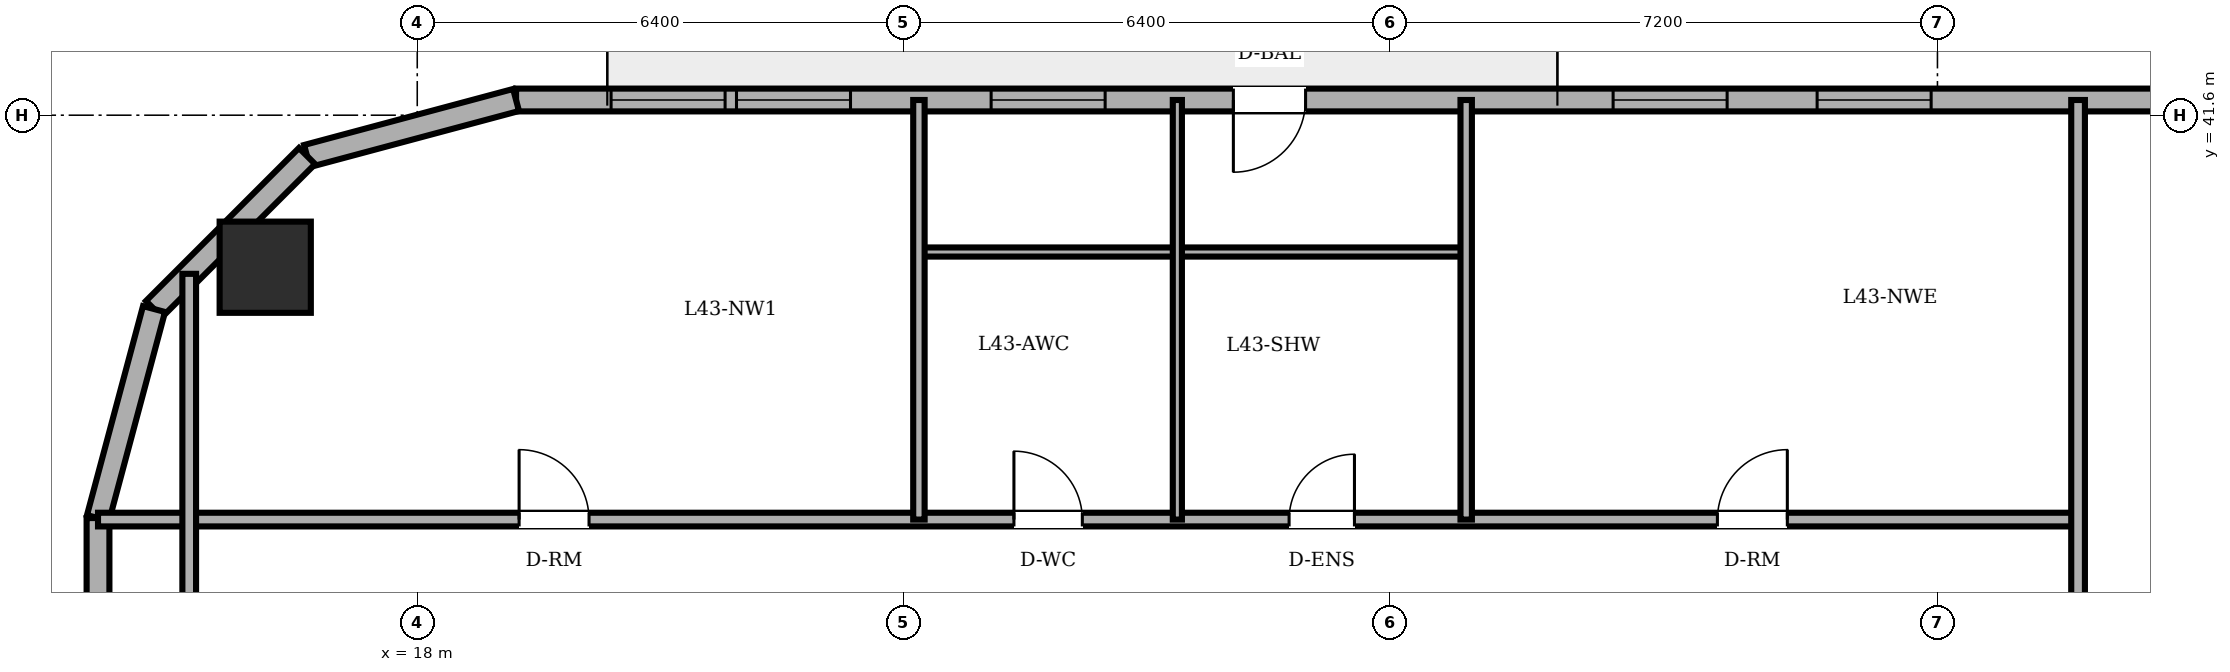
"""IFC4 building model, lengths in metres.
Left out: names, types, materials, properties, quantities, classifications, styles, units other than length and angle.
Written with IfcOpenShell. Run it as: python <this file> out.ifc"""

import sys

from ifc_helpers import new_model, si_unit, direction, frame, frame_2d, origin, origin_2d, place, context, subcontext, project, spatial, rectangle, circle, extrude, element, fill, save


model = new_model("IFC4")
c1 = context("Model", 3, precision=1e-05, world=origin(), true_north=direction((0.0, 1.0)))
c2 = subcontext(c1, "Body", "Model", "MODEL_VIEW")
j1 = project(units=[si_unit("LENGTHUNIT", "METRE"), si_unit("PLANEANGLEUNIT", "RADIAN")], contexts=[c1])
p1 = place(None, origin())
s1 = spatial("IfcSite", under=j1, at=p1, CompositionType="ELEMENT")
p2 = place(p1, origin())
s2 = spatial("IfcBuilding", under=s1, at=p2, CompositionType="ELEMENT")
p3 = place(p2, frame((0.0, 0.0, 165.4)))
s3 = spatial("IfcBuildingStorey", under=s2, at=p3, CompositionType="ELEMENT", Elevation=165.4)
p4 = place(p3, frame((16.0, 39.6, 0.0), z_axis=(0.0, 0.0, 1.0), x_axis=(1.0, 0.0, 0.0)))
e1 = element("IfcColumn", 1, at=p4, inside=s3, PredefinedType="COLUMN", context=c2, shape_type="SweptSolid", body=[
    extrude(circle(Radius=0.6, at=origin_2d()), origin(), (0.0, 0.0, 1.0), 3.6),
])
p5 = place(p3, frame((49.582, 41.8, 0.0), z_axis=(0.0, 0.0, 1.0), x_axis=(-1.0, 0.0, 0.0)))
e2 = element("IfcWall", 2, at=p5, inside=s3, PredefinedType="SOLIDWALL", context=c2, shape_type="SweptSolid", body=[
    extrude(rectangle(XDim=30.282, YDim=0.3, at=frame_2d((15.141, 0.0))), origin(), (0.0, 0.0, 1.0), 3.4),
])
p6 = place(p5, frame((19.895, 0.0, 0.0)))
e3 = element("IfcOpeningElement", 3, at=p6, cuts=e2, PredefinedType="OPENING", context=c2, shape_type="SweptSolid", body=[
    extrude(rectangle(XDim=0.95, YDim=2.2, at=frame_2d((0.475, 1.1))), frame((0.0, 0.16, 0.0), z_axis=(0.0, -1.0, 0.0), x_axis=(1.0, 0.0, 0.0)), (0.0, 0.0, 1.0), 0.32),
])
p7 = place(p5, frame((2.727, 0.0, 0.85)))
e4 = element("IfcOpeningElement", 4, at=p7, cuts=e2, PredefinedType="OPENING", context=c2, shape_type="SweptSolid", body=[
    extrude(rectangle(XDim=1.5, YDim=1.55, at=frame_2d((0.75, 0.775))), frame((0.0, 0.16, 0.0), z_axis=(0.0, -1.0, 0.0), x_axis=(1.0, 0.0, 0.0)), (0.0, 0.0, 1.0), 0.32),
])
p8 = place(p5, frame((5.855, 0.0, 0.85)))
e5 = element("IfcOpeningElement", 5, at=p8, cuts=e2, PredefinedType="OPENING", context=c2, shape_type="SweptSolid", body=[
    extrude(rectangle(XDim=1.5, YDim=1.55, at=frame_2d((0.75, 0.775))), frame((0.0, 0.16, 0.0), z_axis=(0.0, -1.0, 0.0), x_axis=(1.0, 0.0, 0.0)), (0.0, 0.0, 1.0), 0.32),
])
p9 = place(p5, frame((11.665, 0.0, 0.85)))
e6 = element("IfcOpeningElement", 6, at=p9, cuts=e2, PredefinedType="OPENING", context=c2, shape_type="SweptSolid", body=[
    extrude(rectangle(XDim=1.5, YDim=1.55, at=frame_2d((0.75, 0.775))), frame((0.0, 0.16, 0.0), z_axis=(0.0, -1.0, 0.0), x_axis=(1.0, 0.0, 0.0)), (0.0, 0.0, 1.0), 0.32),
])
p10 = place(p5, frame((14.349, 0.0, 0.85)))
e7 = element("IfcOpeningElement", 7, at=p10, cuts=e2, PredefinedType="OPENING", context=c2, shape_type="SweptSolid", body=[
    extrude(rectangle(XDim=1.5, YDim=1.55, at=frame_2d((0.75, 0.775))), frame((0.0, 0.16, 0.0), z_axis=(0.0, -1.0, 0.0), x_axis=(1.0, 0.0, 0.0)), (0.0, 0.0, 1.0), 0.32),
])
p11 = place(p5, frame((22.532, 0.0, 0.85)))
e8 = element("IfcOpeningElement", 8, at=p11, cuts=e2, PredefinedType="OPENING", context=c2, shape_type="SweptSolid", body=[
    extrude(rectangle(XDim=1.5, YDim=1.55, at=frame_2d((0.75, 0.775))), frame((0.0, 0.16, 0.0), z_axis=(0.0, -1.0, 0.0), x_axis=(1.0, 0.0, 0.0)), (0.0, 0.0, 1.0), 0.32),
])
p12 = place(p5, frame((25.882, 0.0, 0.85)))
e9 = element("IfcOpeningElement", 9, at=p12, cuts=e2, PredefinedType="OPENING", context=c2, shape_type="SweptSolid", body=[
    extrude(rectangle(XDim=1.5, YDim=1.55, at=frame_2d((0.75, 0.775))), frame((0.0, 0.16, 0.0), z_axis=(0.0, -1.0, 0.0), x_axis=(1.0, 0.0, 0.0)), (0.0, 0.0, 1.0), 0.32),
])
p13 = place(p5, frame((27.532, 0.0, 0.85)))
e10 = element("IfcOpeningElement", 10, at=p13, cuts=e2, PredefinedType="OPENING", context=c2, shape_type="SweptSolid", body=[
    extrude(rectangle(XDim=1.5, YDim=1.55, at=frame_2d((0.75, 0.775))), frame((0.0, 0.16, 0.0), z_axis=(0.0, -1.0, 0.0), x_axis=(1.0, 0.0, 0.0)), (0.0, 0.0, 1.0), 0.32),
])
p14 = place(p3, frame((19.3, 41.8, 0.0), z_axis=(0.0, 0.0, 1.0), x_axis=(-0.965908238586, -0.258884674387, 0.0)))
e11 = element("IfcWall", 11, at=p14, inside=s3, PredefinedType="SOLIDWALL", context=c2, shape_type="SweptSolid", body=[
    extrude(rectangle(XDim=2.847, YDim=0.3, at=frame_2d((1.424, 0.0))), origin(), (0.0, 0.0, 1.0), 3.4),
])
p15 = place(p3, frame((16.55, 41.063, 0.0), z_axis=(0.0, 0.0, 1.0), x_axis=(-0.707106781187, -0.707106781187, 0.0)))
e12 = element("IfcWall", 12, at=p15, inside=s3, PredefinedType="SOLIDWALL", context=c2, shape_type="SweptSolid", body=[
    extrude(rectangle(XDim=2.847, YDim=0.3, at=frame_2d((1.423, 0.0))), origin(), (0.0, 0.0, 1.0), 3.4),
])
p16 = place(p3, frame((14.537, 39.05, 0.0), z_axis=(0.0, 0.0, 1.0), x_axis=(-0.258884674387, -0.965908238586, 0.0)))
e13 = element("IfcWall", 13, at=p16, inside=s3, PredefinedType="SOLIDWALL", context=c2, shape_type="SweptSolid", body=[
    extrude(rectangle(XDim=2.847, YDim=0.3, at=frame_2d((1.424, 0.0))), origin(), (0.0, 0.0, 1.0), 3.4),
])
p17 = place(p3, frame((13.8, 36.3, 0.0), z_axis=(0.0, 0.0, 1.0), x_axis=(0.0, -1.0, 0.0)))
e14 = element("IfcWall", 14, at=p17, inside=s3, PredefinedType="SOLIDWALL", context=c2, shape_type="SweptSolid", body=[
    extrude(rectangle(XDim=24.6, YDim=0.3, at=frame_2d((12.3, 0.0))), origin(), (0.0, 0.0, 1.0), 3.4),
])
p18 = place(p17, frame((5.003, 0.0, 0.85)))
e15 = element("IfcOpeningElement", 15, at=p18, cuts=e14, PredefinedType="OPENING", context=c2, shape_type="SweptSolid", body=[
    extrude(rectangle(XDim=1.5, YDim=1.55, at=frame_2d((0.75, 0.775))), frame((0.0, 0.16, 0.0), z_axis=(0.0, -1.0, 0.0), x_axis=(1.0, 0.0, 0.0)), (0.0, 0.0, 1.0), 0.32),
])
p19 = place(p17, frame((8.277, 0.0, 0.85)))
e16 = element("IfcOpeningElement", 16, at=p19, cuts=e14, PredefinedType="OPENING", context=c2, shape_type="SweptSolid", body=[
    extrude(rectangle(XDim=1.5, YDim=1.55, at=frame_2d((0.75, 0.775))), frame((0.0, 0.16, 0.0), z_axis=(0.0, -1.0, 0.0), x_axis=(1.0, 0.0, 0.0)), (0.0, 0.0, 1.0), 0.32),
])
p20 = place(p17, frame((14.823, 0.0, 0.85)))
e17 = element("IfcOpeningElement", 17, at=p20, cuts=e14, PredefinedType="OPENING", context=c2, shape_type="SweptSolid", body=[
    extrude(rectangle(XDim=1.5, YDim=1.55, at=frame_2d((0.75, 0.775))), frame((0.0, 0.16, 0.0), z_axis=(0.0, -1.0, 0.0), x_axis=(1.0, 0.0, 0.0)), (0.0, 0.0, 1.0), 0.32),
])
p21 = place(p17, frame((18.097, 0.0, 0.85)))
e18 = element("IfcOpeningElement", 18, at=p21, cuts=e14, PredefinedType="OPENING", context=c2, shape_type="SweptSolid", body=[
    extrude(rectangle(XDim=1.5, YDim=1.55, at=frame_2d((0.75, 0.775))), frame((0.0, 0.16, 0.0), z_axis=(0.0, -1.0, 0.0), x_axis=(1.0, 0.0, 0.0)), (0.0, 0.0, 1.0), 0.32),
])
p22 = place(p3, frame((13.8, 36.28, 0.0), z_axis=(0.0, 0.0, 1.0), x_axis=(1.0, 0.0, 0.0)))
e19 = element("IfcWall", 19, at=p22, inside=s3, PredefinedType="PARTITIONING", context=c2, shape_type="SweptSolid", body=[
    extrude(rectangle(XDim=26.05, YDim=0.18, at=frame_2d((13.025, 0.0))), origin(), (0.0, 0.0, 1.0), 3.4),
])
p23 = place(p22, frame((12.05, 0.0, 0.0)))
e20 = element("IfcOpeningElement", 20, at=p23, cuts=e19, PredefinedType="OPENING", context=c2, shape_type="SweptSolid", body=[
    extrude(rectangle(XDim=0.9, YDim=2.1, at=frame_2d((0.45, 1.05))), frame((0.0, 0.1, 0.0), z_axis=(0.0, -1.0, 0.0), x_axis=(1.0, 0.0, 0.0)), (0.0, 0.0, 1.0), 0.2),
])
p24 = place(p22, frame((15.67, 0.0, 0.0)))
e21 = element("IfcOpeningElement", 21, at=p24, cuts=e19, PredefinedType="OPENING", context=c2, shape_type="SweptSolid", body=[
    extrude(rectangle(XDim=0.86, YDim=2.1, at=frame_2d((0.43, 1.05))), frame((0.0, 0.1, 0.0), z_axis=(0.0, -1.0, 0.0), x_axis=(1.0, 0.0, 0.0)), (0.0, 0.0, 1.0), 0.2),
])
p25 = place(p22, frame((5.54, 0.0, 0.0)))
e22 = element("IfcOpeningElement", 22, at=p25, cuts=e19, PredefinedType="OPENING", context=c2, shape_type="SweptSolid", body=[
    extrude(rectangle(XDim=0.92, YDim=2.1, at=frame_2d((0.46, 1.05))), frame((0.0, 0.1, 0.0), z_axis=(0.0, -1.0, 0.0), x_axis=(1.0, 0.0, 0.0)), (0.0, 0.0, 1.0), 0.2),
])
p26 = place(p22, frame((21.305, 0.0, 0.0)))
e23 = element("IfcOpeningElement", 23, at=p26, cuts=e19, PredefinedType="OPENING", context=c2, shape_type="SweptSolid", body=[
    extrude(rectangle(XDim=0.92, YDim=2.1, at=frame_2d((0.46, 1.05))), frame((0.0, 0.1, 0.0), z_axis=(0.0, -1.0, 0.0), x_axis=(1.0, 0.0, 0.0)), (0.0, 0.0, 1.0), 0.2),
])
p27 = place(p3, frame((24.6, 39.8, 0.0), z_axis=(0.0, 0.0, 1.0), x_axis=(1.0, 0.0, 0.0)))
e24 = element("IfcWall", 24, at=p27, inside=s3, PredefinedType="PARTITIONING", context=c2, shape_type="SweptSolid", body=[
    extrude(rectangle(XDim=7.2, YDim=0.12, at=frame_2d((3.6, 0.0))), origin(), (0.0, 0.0, 1.0), 2.882),
])
p28 = place(p3, frame((15.0, 33.82, 0.0), z_axis=(0.0, 0.0, 1.0), x_axis=(0.0, 1.0, 0.0)))
e25 = element("IfcWall", 25, at=p28, inside=s3, PredefinedType="PARTITIONING", context=c2, shape_type="SweptSolid", body=[
    extrude(rectangle(XDim=5.693, YDim=0.18, at=frame_2d((2.846, 0.0))), origin(), (0.0, 0.0, 1.0), 3.4),
])
p29 = place(p3, frame((24.6, 36.28, 0.0), z_axis=(0.0, 0.0, 1.0), x_axis=(0.0, 1.0, 0.0)))
e26 = element("IfcWall", 26, at=p29, inside=s3, PredefinedType="PARTITIONING", context=c2, shape_type="SweptSolid", body=[
    extrude(rectangle(XDim=5.52, YDim=0.15, at=frame_2d((2.76, 0.0))), origin(), (0.0, 0.0, 1.0), 3.4),
])
p30 = place(p3, frame((28.0, 36.28, 0.0), z_axis=(0.0, 0.0, 1.0), x_axis=(0.0, 1.0, 0.0)))
e27 = element("IfcWall", 27, at=p30, inside=s3, PredefinedType="PARTITIONING", context=c2, shape_type="SweptSolid", body=[
    extrude(rectangle(XDim=5.52, YDim=0.12, at=frame_2d((2.76, 0.0))), origin(), (0.0, 0.0, 1.0), 3.4),
])
p31 = place(p3, frame((31.8, 36.28, 0.0), z_axis=(0.0, 0.0, 1.0), x_axis=(0.0, 1.0, 0.0)))
e28 = element("IfcWall", 28, at=p31, inside=s3, PredefinedType="PARTITIONING", context=c2, shape_type="SweptSolid", body=[
    extrude(rectangle(XDim=5.52, YDim=0.15, at=frame_2d((2.76, 0.0))), origin(), (0.0, 0.0, 1.0), 3.4),
])
p32 = place(p3, frame((39.85, 14.18, 0.0), z_axis=(0.0, 0.0, 1.0), x_axis=(0.0, 1.0, 0.0)))
e29 = element("IfcWall", 29, at=p32, inside=s3, PredefinedType="PARTITIONING", context=c2, shape_type="SweptSolid", body=[
    extrude(rectangle(XDim=27.62, YDim=0.18, at=frame_2d((13.81, 0.0))), origin(), (0.0, 0.0, 1.0), 3.4),
])
p33 = place(p32, frame((14.47, 0.0, 0.0)))
e30 = element("IfcOpeningElement", 30, at=p33, cuts=e29, PredefinedType="OPENING", context=c2, shape_type="SweptSolid", body=[
    extrude(rectangle(XDim=0.92, YDim=2.1, at=frame_2d((0.46, 1.05))), frame((0.0, 0.1, 0.0), z_axis=(0.0, -1.0, 0.0), x_axis=(1.0, 0.0, 0.0)), (0.0, 0.0, 1.0), 0.2),
])
p34 = place(p6, origin())
e31 = element("IfcDoor", 31, at=p34, inside=s3, OperationType="SINGLE_SWING_RIGHT", PredefinedType="DOOR", context=c2, shape_type="SweptSolid", body=[
    extrude(rectangle(XDim=0.95, YDim=2.2, at=frame_2d((0.475, 1.1))), frame((0.0, 0.025, 0.0), z_axis=(0.0, -1.0, 0.0), x_axis=(1.0, 0.0, 0.0)), (0.0, 0.0, 1.0), 0.05),
])
fill(e3, e31)
p35 = place(p9, origin())
e32 = element("IfcWindow", 32, at=p35, inside=s3, PartitioningType="DOUBLE_PANEL_VERTICAL", PredefinedType="WINDOW", context=c2, shape_type="SweptSolid", body=[
    extrude(rectangle(XDim=1.5, YDim=1.55, at=frame_2d((0.75, 0.775))), frame((0.0, 0.03, 0.0), z_axis=(0.0, -1.0, 0.0), x_axis=(1.0, 0.0, 0.0)), (0.0, 0.0, 1.0), 0.06),
])
fill(e6, e32)
p36 = place(p10, origin())
e33 = element("IfcWindow", 33, at=p36, inside=s3, PartitioningType="DOUBLE_PANEL_VERTICAL", PredefinedType="WINDOW", context=c2, shape_type="SweptSolid", body=[
    extrude(rectangle(XDim=1.5, YDim=1.55, at=frame_2d((0.75, 0.775))), frame((0.0, 0.03, 0.0), z_axis=(0.0, -1.0, 0.0), x_axis=(1.0, 0.0, 0.0)), (0.0, 0.0, 1.0), 0.06),
])
fill(e7, e33)
p37 = place(p11, origin())
e34 = element("IfcWindow", 34, at=p37, inside=s3, PartitioningType="DOUBLE_PANEL_VERTICAL", PredefinedType="WINDOW", context=c2, shape_type="SweptSolid", body=[
    extrude(rectangle(XDim=1.5, YDim=1.55, at=frame_2d((0.75, 0.775))), frame((0.0, 0.03, 0.0), z_axis=(0.0, -1.0, 0.0), x_axis=(1.0, 0.0, 0.0)), (0.0, 0.0, 1.0), 0.06),
])
fill(e8, e34)
p38 = place(p12, origin())
e35 = element("IfcWindow", 35, at=p38, inside=s3, PartitioningType="DOUBLE_PANEL_VERTICAL", PredefinedType="WINDOW", context=c2, shape_type="SweptSolid", body=[
    extrude(rectangle(XDim=1.5, YDim=1.55, at=frame_2d((0.75, 0.775))), frame((0.0, 0.03, 0.0), z_axis=(0.0, -1.0, 0.0), x_axis=(1.0, 0.0, 0.0)), (0.0, 0.0, 1.0), 0.06),
])
fill(e9, e35)
p39 = place(p13, origin())
e36 = element("IfcWindow", 36, at=p39, inside=s3, PartitioningType="DOUBLE_PANEL_VERTICAL", PredefinedType="WINDOW", context=c2, shape_type="SweptSolid", body=[
    extrude(rectangle(XDim=1.5, YDim=1.55, at=frame_2d((0.75, 0.775))), frame((0.0, 0.03, 0.0), z_axis=(0.0, -1.0, 0.0), x_axis=(1.0, 0.0, 0.0)), (0.0, 0.0, 1.0), 0.06),
])
fill(e10, e36)
p40 = place(p23, origin())
e37 = element("IfcDoor", 37, at=p40, inside=s3, OperationType="SINGLE_SWING_LEFT", PredefinedType="DOOR", context=c2, shape_type="SweptSolid", body=[
    extrude(rectangle(XDim=0.9, YDim=2.1, at=frame_2d((0.45, 1.05))), frame((0.0, 0.025, 0.0), z_axis=(0.0, -1.0, 0.0), x_axis=(1.0, 0.0, 0.0)), (0.0, 0.0, 1.0), 0.05),
])
fill(e20, e37)
p41 = place(p24, origin())
e38 = element("IfcDoor", 38, at=p41, inside=s3, OperationType="SINGLE_SWING_RIGHT", PredefinedType="DOOR", context=c2, shape_type="SweptSolid", body=[
    extrude(rectangle(XDim=0.86, YDim=2.1, at=frame_2d((0.43, 1.05))), frame((0.0, 0.025, 0.0), z_axis=(0.0, -1.0, 0.0), x_axis=(1.0, 0.0, 0.0)), (0.0, 0.0, 1.0), 0.05),
])
fill(e21, e38)
p42 = place(p25, origin())
e39 = element("IfcDoor", 39, at=p42, inside=s3, OperationType="SINGLE_SWING_LEFT", PredefinedType="DOOR", context=c2, shape_type="SweptSolid", body=[
    extrude(rectangle(XDim=0.92, YDim=2.1, at=frame_2d((0.46, 1.05))), frame((0.0, 0.025, 0.0), z_axis=(0.0, -1.0, 0.0), x_axis=(1.0, 0.0, 0.0)), (0.0, 0.0, 1.0), 0.05),
])
fill(e22, e39)
p43 = place(p26, origin())
e40 = element("IfcDoor", 40, at=p43, inside=s3, OperationType="SINGLE_SWING_RIGHT", PredefinedType="DOOR", context=c2, shape_type="SweptSolid", body=[
    extrude(rectangle(XDim=0.92, YDim=2.1, at=frame_2d((0.46, 1.05))), frame((0.0, 0.025, 0.0), z_axis=(0.0, -1.0, 0.0), x_axis=(1.0, 0.0, 0.0)), (0.0, 0.0, 1.0), 0.05),
])
fill(e23, e40)
save(model, sys.argv[1])
